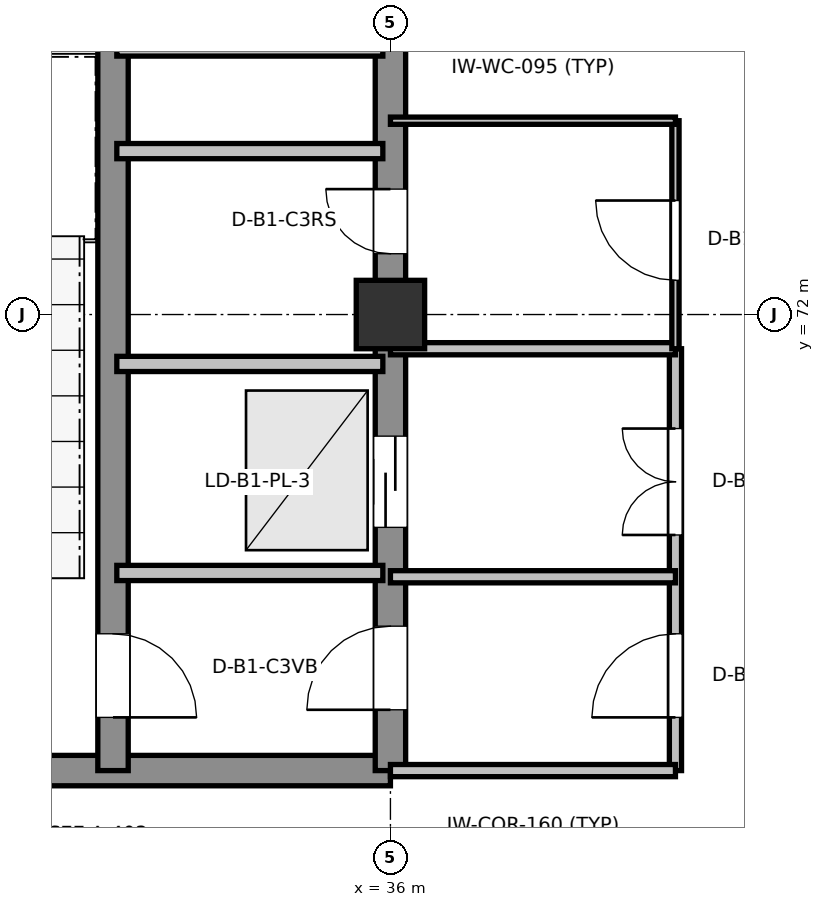
"""IFC4 building model, lengths in metres.
Left out: names, types, materials, properties, quantities, classifications, styles, units other than length and angle.
Written with IfcOpenShell. Run it as: python <this file> out.ifc"""

import sys

from ifc_helpers import new_model, si_unit, direction, frame, frame_2d, origin, origin_2d, place, context, subcontext, project, spatial, rectangle, extrude, element, fill, save


model = new_model("IFC4")
c1 = context("Model", 3, precision=1e-05, world=origin(), true_north=direction((0.0, 1.0)))
c2 = subcontext(c1, "Body", "Model", "MODEL_VIEW")
j1 = project(units=[si_unit("LENGTHUNIT", "METRE"), si_unit("PLANEANGLEUNIT", "RADIAN")], contexts=[c1])
p1 = place(None, origin())
s1 = spatial("IfcSite", under=j1, at=p1, CompositionType="ELEMENT")
p2 = place(p1, origin())
s2 = spatial("IfcBuilding", under=s1, at=p2, CompositionType="ELEMENT")
p3 = place(p2, frame((0.0, 0.0, -4.8)))
s3 = spatial("IfcBuildingStorey", under=s2, at=p3, CompositionType="ELEMENT", Elevation=-4.8)
p4 = place(p3, frame((36.0, 72.0, 0.0), z_axis=(0.0, 0.0, 1.0), x_axis=(1.0, 0.0, 0.0)))
e1 = element("IfcColumn", 1, at=p4, inside=s3, PredefinedType="COLUMN", context=c2, shape_type="SweptSolid", body=[
    extrude(rectangle(XDim=0.9, YDim=0.9, at=origin_2d()), origin(), (0.0, 0.0, 1.0), 4.8),
])
p5 = place(p3, frame((27.0, 66.0, 0.0), z_axis=(0.0, 0.0, 1.0), x_axis=(1.0, 0.0, 0.0)))
e2 = element("IfcWall", 2, at=p5, inside=s3, PredefinedType="SHEAR", context=c2, shape_type="SweptSolid", body=[
    extrude(rectangle(XDim=9.0, YDim=0.4, at=frame_2d((4.5, 0.0))), origin(), (0.0, 0.0, 1.0), 4.55),
])
p6 = place(p3, frame((36.0, 66.0, 0.0), z_axis=(0.0, 0.0, 1.0), x_axis=(0.0, 1.0, 0.0)))
e3 = element("IfcWall", 3, at=p6, inside=s3, PredefinedType="SHEAR", context=c2, shape_type="SweptSolid", body=[
    extrude(rectangle(XDim=18.0, YDim=0.4, at=frame_2d((9.0, 0.0))), origin(), (0.0, 0.0, 1.0), 4.55),
])
p7 = place(p6, frame((0.8, 0.0, 0.0)))
e4 = element("IfcOpeningElement", 4, at=p7, cuts=e3, PredefinedType="OPENING", context=c2, shape_type="SweptSolid", body=[
    extrude(rectangle(XDim=1.1, YDim=2.16, at=frame_2d((0.55, 1.08))), frame((0.0, 0.21, 0.0), z_axis=(0.0, -1.0, 0.0), x_axis=(1.0, 0.0, 0.0)), (0.0, 0.0, 1.0), 0.42),
])
p8 = place(p6, frame((3.2, 0.0, 0.0)))
e5 = element("IfcOpeningElement", 5, at=p8, cuts=e3, PredefinedType="OPENING", context=c2, shape_type="SweptSolid", body=[
    extrude(rectangle(XDim=1.2, YDim=2.2, at=frame_2d((0.6, 1.1))), frame((0.0, 0.21, 0.0), z_axis=(0.0, -1.0, 0.0), x_axis=(1.0, 0.0, 0.0)), (0.0, 0.0, 1.0), 0.42),
])
p9 = place(p6, frame((6.8, 0.0, 0.0)))
e6 = element("IfcOpeningElement", 6, at=p9, cuts=e3, PredefinedType="OPENING", context=c2, shape_type="SweptSolid", body=[
    extrude(rectangle(XDim=0.85, YDim=2.1, at=frame_2d((0.425, 1.05))), frame((0.0, 0.21, 0.0), z_axis=(0.0, -1.0, 0.0), x_axis=(1.0, 0.0, 0.0)), (0.0, 0.0, 1.0), 0.42),
])
p10 = place(p3, frame((32.35, 66.0, 0.0), z_axis=(0.0, 0.0, 1.0), x_axis=(0.0, 1.0, 0.0)))
e7 = element("IfcWall", 7, at=p10, inside=s3, PredefinedType="SHEAR", context=c2, shape_type="SweptSolid", body=[
    extrude(rectangle(XDim=18.0, YDim=0.4, at=frame_2d((9.0, 0.0))), origin(), (0.0, 0.0, 1.0), 4.55),
])
p11 = place(p10, frame((0.7, 0.0, 0.0)))
e8 = element("IfcOpeningElement", 8, at=p11, cuts=e7, PredefinedType="OPENING", context=c2, shape_type="SweptSolid", body=[
    extrude(rectangle(XDim=1.1, YDim=2.16, at=frame_2d((0.55, 1.08))), frame((0.0, 0.21, 0.0), z_axis=(0.0, -1.0, 0.0), x_axis=(1.0, 0.0, 0.0)), (0.0, 0.0, 1.0), 0.42),
])
for number, where, z_axis, x_axis in (
    (9, (32.4, 68.6, 0.0), (0.0, 0.0, 1.0), (1.0, 0.0, 0.0)),
    (10, (32.4, 71.35, 0.0), (0.0, 0.0, 1.0), (1.0, 0.0, 0.0)),
    (11, (32.4, 74.15, 0.0), (0.0, 0.0, 1.0), (1.0, 0.0, 0.0)),
    (12, (32.4, 75.5, 0.0), (0.0, 0.0, 1.0), (1.0, 0.0, 0.0)),
):
    element("IfcWall", number, at=place(p3, frame(where, z_axis=z_axis, x_axis=x_axis)), inside=s3, PredefinedType="PARTITIONING", context=c2, shape_type="SweptSolid", body=[
        extrude(rectangle(XDim=3.5, YDim=0.2, at=frame_2d((1.75, 0.0))), origin(), (0.0, 0.0, 1.0), 4.55),
    ])
p12 = place(p3, frame((39.75, 66.0, 0.0), z_axis=(0.0, 0.0, 1.0), x_axis=(0.0, 1.0, 0.0)))
e13 = element("IfcWall", 13, at=p12, inside=s3, PredefinedType="PARTITIONING", context=c2, shape_type="SweptSolid", body=[
    extrude(rectangle(XDim=5.55, YDim=0.16, at=frame_2d((2.775, 0.0))), origin(), (0.0, 0.0, 1.0), 4.55),
])
p13 = place(p12, frame((0.7, 0.0, 0.0)))
e14 = element("IfcOpeningElement", 14, at=p13, cuts=e13, PredefinedType="OPENING", context=c2, shape_type="SweptSolid", body=[
    extrude(rectangle(XDim=1.1, YDim=2.16, at=frame_2d((0.55, 1.08))), frame((0.0, 0.09, 0.0), z_axis=(0.0, -1.0, 0.0), x_axis=(1.0, 0.0, 0.0)), (0.0, 0.0, 1.0), 0.18),
])
p14 = place(p12, frame((3.1, 0.0, 0.0)))
e15 = element("IfcOpeningElement", 15, at=p14, cuts=e13, PredefinedType="OPENING", context=c2, shape_type="SweptSolid", body=[
    extrude(rectangle(XDim=1.4, YDim=2.2, at=frame_2d((0.7, 1.1))), frame((0.0, 0.09, 0.0), z_axis=(0.0, -1.0, 0.0), x_axis=(1.0, 0.0, 0.0)), (0.0, 0.0, 1.0), 0.18),
])
p15 = place(p3, frame((36.0, 66.0, 0.0), z_axis=(0.0, 0.0, 1.0), x_axis=(1.0, 0.0, 0.0)))
e16 = element("IfcWall", 16, at=p15, inside=s3, PredefinedType="PARTITIONING", context=c2, shape_type="SweptSolid", body=[
    extrude(rectangle(XDim=3.75, YDim=0.16, at=frame_2d((1.875, 0.0))), origin(), (0.0, 0.0, 1.0), 4.085),
])
for number, where, z_axis, x_axis in (
    (17, (36.0, 68.55, 0.0), (0.0, 0.0, 1.0), (1.0, 0.0, 0.0)),
    (18, (36.0, 71.55, 0.0), (0.0, 0.0, 1.0), (1.0, 0.0, 0.0)),
):
    element("IfcWall", number, at=place(p3, frame(where, z_axis=z_axis, x_axis=x_axis)), inside=s3, PredefinedType="PARTITIONING", context=c2, shape_type="SweptSolid", body=[
        extrude(rectangle(XDim=3.75, YDim=0.16, at=frame_2d((1.875, 0.0))), origin(), (0.0, 0.0, 1.0), 4.55),
    ])
p16 = place(p3, frame((39.75, 71.55, 0.0), z_axis=(0.0, 0.0, 1.0), x_axis=(0.0, 1.0, 0.0)))
e19 = element("IfcWall", 19, at=p16, inside=s3, PredefinedType="PARTITIONING", context=c2, shape_type="SweptSolid", body=[
    extrude(rectangle(XDim=3.0, YDim=0.095, at=frame_2d((1.5, 0.0))), origin(), (0.0, 0.0, 1.0), 4.55),
])
p17 = place(p16, frame((0.9, 0.0, 0.0)))
e20 = element("IfcOpeningElement", 20, at=p17, cuts=e19, PredefinedType="OPENING", context=c2, shape_type="SweptSolid", body=[
    extrude(rectangle(XDim=1.05, YDim=2.13, at=frame_2d((0.525, 1.065))), frame((0.0, 0.057, 0.0), z_axis=(0.0, -1.0, 0.0), x_axis=(1.0, 0.0, 0.0)), (0.0, 0.0, 1.0), 0.115),
])
p18 = place(p3, frame((36.0, 74.55, 0.0), z_axis=(0.0, 0.0, 1.0), x_axis=(1.0, 0.0, 0.0)))
e21 = element("IfcWall", 21, at=p18, inside=s3, PredefinedType="PARTITIONING", context=c2, shape_type="SweptSolid", body=[
    extrude(rectangle(XDim=3.75, YDim=0.095, at=frame_2d((1.875, 0.0))), origin(), (0.0, 0.0, 1.0), 4.55),
])
p19 = place(p11, frame((1.1, 0.0, 0.0), z_axis=(0.0, 0.0, 1.0), x_axis=(-1.0, 0.0, 0.0)))
e22 = element("IfcDoor", 22, at=p19, inside=s3, OperationType="SINGLE_SWING_RIGHT", PredefinedType="DOOR", context=c2, shape_type="SweptSolid", body=[
    extrude(rectangle(XDim=1.1, YDim=2.16, at=frame_2d((0.55, 1.08))), frame((0.0, 0.025, 0.0), z_axis=(0.0, -1.0, 0.0), x_axis=(1.0, 0.0, 0.0)), (0.0, 0.0, 1.0), 0.05),
])
fill(e8, e22)
p20 = place(p7, origin())
e23 = element("IfcDoor", 23, at=p20, inside=s3, OperationType="SINGLE_SWING_LEFT", PredefinedType="DOOR", context=c2, shape_type="SweptSolid", body=[
    extrude(rectangle(XDim=1.1, YDim=2.16, at=frame_2d((0.55, 1.08))), frame((0.0, 0.025, 0.0), z_axis=(0.0, -1.0, 0.0), x_axis=(1.0, 0.0, 0.0)), (0.0, 0.0, 1.0), 0.05),
])
fill(e4, e23)
p21 = place(p8, origin())
e24 = element("IfcDoor", 24, at=p21, inside=s3, OperationType="SLIDING_TO_LEFT", PredefinedType="DOOR", context=c2, shape_type="SweptSolid", body=[
    extrude(rectangle(XDim=1.2, YDim=2.2, at=frame_2d((0.6, 1.1))), frame((0.0, 0.025, 0.0), z_axis=(0.0, -1.0, 0.0), x_axis=(1.0, 0.0, 0.0)), (0.0, 0.0, 1.0), 0.05),
])
fill(e5, e24)
p22 = place(p9, origin())
e25 = element("IfcDoor", 25, at=p22, inside=s3, OperationType="SINGLE_SWING_RIGHT", PredefinedType="DOOR", context=c2, shape_type="SweptSolid", body=[
    extrude(rectangle(XDim=0.85, YDim=2.1, at=frame_2d((0.425, 1.05))), frame((0.0, 0.025, 0.0), z_axis=(0.0, -1.0, 0.0), x_axis=(1.0, 0.0, 0.0)), (0.0, 0.0, 1.0), 0.05),
])
fill(e6, e25)
p23 = place(p13, origin())
e26 = element("IfcDoor", 26, at=p23, inside=s3, OperationType="SINGLE_SWING_LEFT", PredefinedType="DOOR", context=c2, shape_type="SweptSolid", body=[
    extrude(rectangle(XDim=1.1, YDim=2.16, at=frame_2d((0.55, 1.08))), frame((0.0, 0.025, 0.0), z_axis=(0.0, -1.0, 0.0), x_axis=(1.0, 0.0, 0.0)), (0.0, 0.0, 1.0), 0.05),
])
fill(e14, e26)
p24 = place(p14, origin())
e27 = element("IfcDoor", 27, at=p24, inside=s3, OperationType="DOUBLE_DOOR_SINGLE_SWING", PredefinedType="DOOR", context=c2, shape_type="SweptSolid", body=[
    extrude(rectangle(XDim=1.4, YDim=2.2, at=frame_2d((0.7, 1.1))), frame((0.0, 0.025, 0.0), z_axis=(0.0, -1.0, 0.0), x_axis=(1.0, 0.0, 0.0)), (0.0, 0.0, 1.0), 0.05),
])
fill(e15, e27)
p25 = place(p17, origin())
e28 = element("IfcDoor", 28, at=p25, inside=s3, OperationType="SINGLE_SWING_RIGHT", PredefinedType="DOOR", context=c2, shape_type="SweptSolid", body=[
    extrude(rectangle(XDim=1.05, YDim=2.13, at=frame_2d((0.525, 1.065))), frame((0.0, 0.025, 0.0), z_axis=(0.0, -1.0, 0.0), x_axis=(1.0, 0.0, 0.0)), (0.0, 0.0, 1.0), 0.05),
])
fill(e20, e28)
save(model, sys.argv[1])
